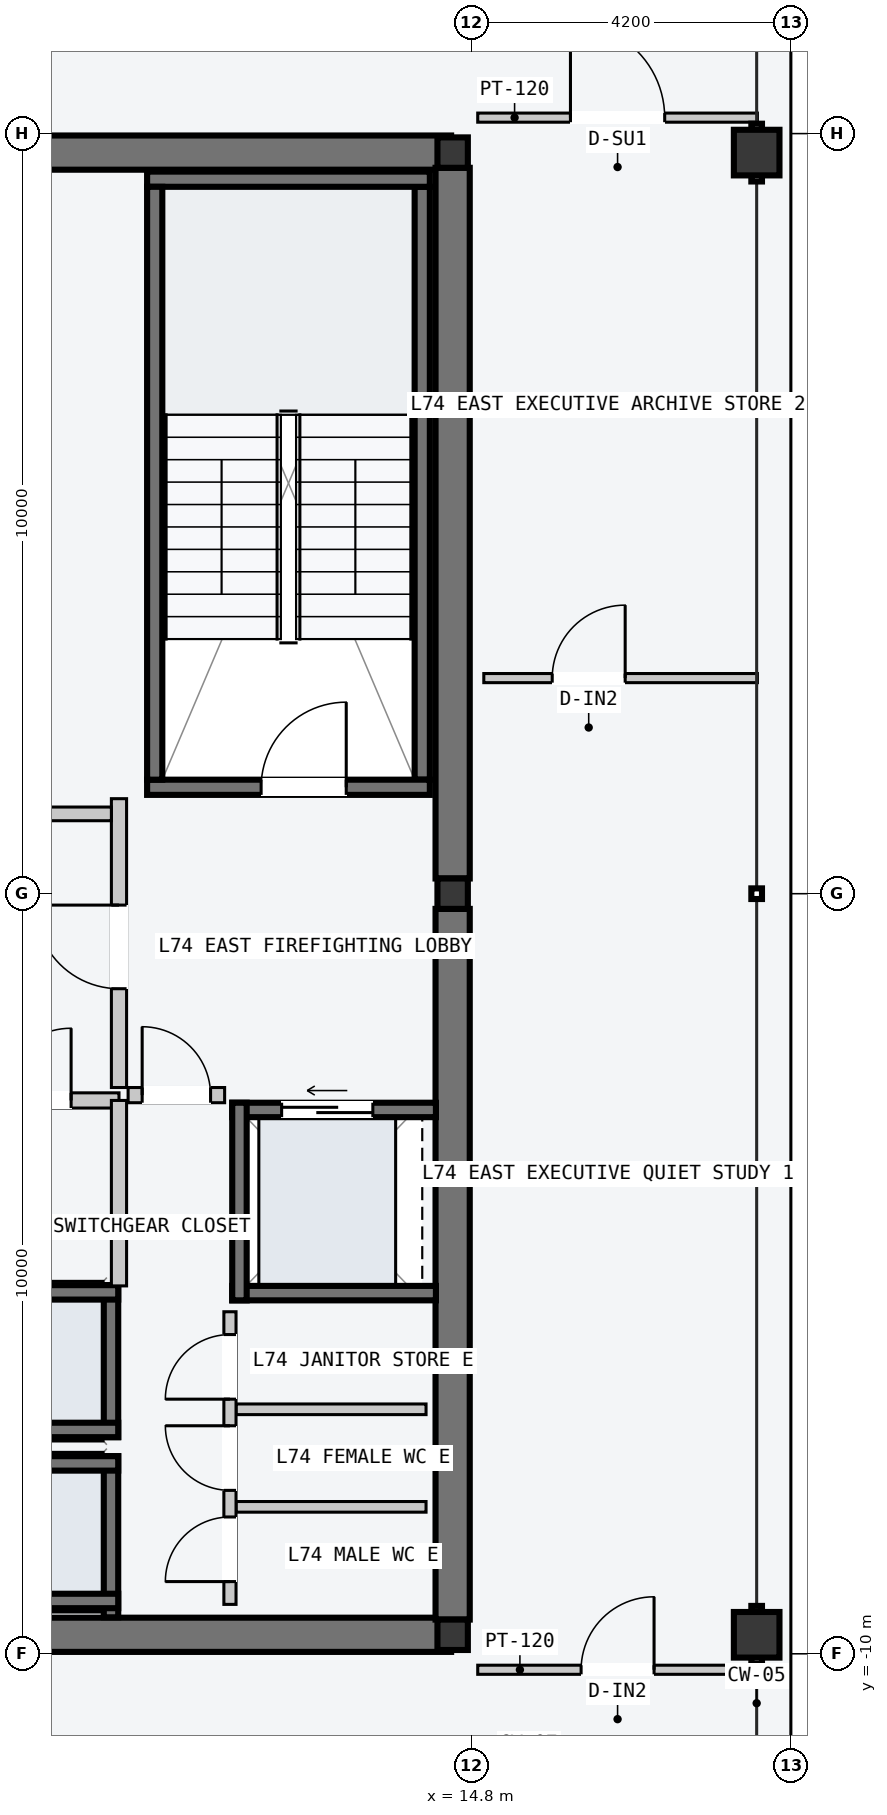
"""IFC4 building model, lengths in metres.
Left out: names, types, materials, properties, quantities, classifications, styles, units other than length and angle.
Written with IfcOpenShell. Run it as: python <this file> out.ifc"""

import sys

from ifc_helpers import new_model, si_unit, direction, frame, frame_2d, origin, origin_2d, place, context, subcontext, project, spatial, rectangle, hollow_rectangle, i_section, extrude, element, fill, save


model = new_model("IFC4")
c1 = context("Model", 3, precision=1e-05, world=origin(), true_north=direction((0.0, 1.0)))
c2 = subcontext(c1, "Body", "Model", "MODEL_VIEW")
j1 = project(units=[si_unit("LENGTHUNIT", "METRE"), si_unit("PLANEANGLEUNIT", "RADIAN")], contexts=[c1])
p1 = place(None, origin())
s1 = spatial("IfcSite", under=j1, at=p1, CompositionType="ELEMENT")
p2 = place(p1, origin())
s2 = spatial("IfcBuilding", under=s1, at=p2, CompositionType="ELEMENT")
p3 = place(p2, frame((0.0, 0.0, 280.8)))
s3 = spatial("IfcBuildingStorey", under=s2, at=p3, CompositionType="ELEMENT", Elevation=280.8)
for number, where, z_axis, x_axis in (
    (1, (8.07, -9.75, -0.2), (0.0, 0.0, 1.0), (1.0, 0.0, 0.0)),
    (2, (8.07, 9.75, -0.2), (0.0, 0.0, 1.0), (1.0, 0.0, 0.0)),
):
    element("IfcWall", number, at=place(p3, frame(where, z_axis=z_axis, x_axis=x_axis)), inside=s3, PredefinedType="SHEAR", context=c2, shape_type="SweptSolid", body=[
        extrude(rectangle(XDim=6.46, YDim=0.45, at=frame_2d((3.23, 0.0))), origin(), (0.0, 0.0, 1.0), 3.6),
    ])
for number, where, z_axis, x_axis in (
    (3, (14.55, -9.55, -0.2), (0.0, 0.0, 1.0), (0.0, 1.0, 0.0)),
    (4, (14.55, 0.2, -0.2), (0.0, 0.0, 1.0), (0.0, 1.0, 0.0)),
):
    element("IfcWall", number, at=place(p3, frame(where, z_axis=z_axis, x_axis=x_axis)), inside=s3, PredefinedType="SHEAR", context=c2, shape_type="SweptSolid", body=[
        extrude(rectangle(XDim=9.35, YDim=0.45, at=frame_2d((4.675, 0.0))), origin(), (0.0, 0.0, 1.0), 3.6),
    ])
p4 = place(p3, frame((14.15, 1.5, -0.2), z_axis=(0.0, 0.0, 1.0), x_axis=(0.0, 1.0, 0.0)))
e5 = element("IfcWall", 5, at=p4, inside=s3, PredefinedType="SOLIDWALL", context=c2, shape_type="SweptSolid", body=[
    extrude(rectangle(XDim=7.8, YDim=0.2, at=frame_2d((3.9, 0.0))), origin(), (0.0, 0.0, 1.0), 3.6),
])
p5 = place(p3, frame((10.53, 1.4, -0.2), z_axis=(0.0, 0.0, 1.0), x_axis=(1.0, 0.0, 0.0)))
e6 = element("IfcWall", 6, at=p5, inside=s3, PredefinedType="SOLIDWALL", context=c2, shape_type="SweptSolid", body=[
    extrude(rectangle(XDim=3.72, YDim=0.2, at=frame_2d((1.86, 0.0))), origin(), (0.0, 0.0, 1.0), 3.6),
])
p6 = place(p5, frame((1.5, 0.0, 0.2)))
e7 = element("IfcOpeningElement", 7, at=p6, cuts=e6, PredefinedType="OPENING", context=c2, shape_type="SweptSolid", body=[
    extrude(rectangle(XDim=1.12, YDim=2.18, at=frame_2d((0.56, 1.09))), frame((0.0, 0.11, 0.0), z_axis=(0.0, -1.0, 0.0), x_axis=(1.0, 0.0, 0.0)), (0.0, 0.0, 1.0), 0.22),
])
p7 = place(p3, frame((10.53, 9.4, -0.2), z_axis=(0.0, 0.0, 1.0), x_axis=(1.0, 0.0, 0.0)))
e8 = element("IfcWall", 8, at=p7, inside=s3, PredefinedType="SOLIDWALL", context=c2, shape_type="SweptSolid", body=[
    extrude(rectangle(XDim=3.72, YDim=0.2, at=frame_2d((1.86, 0.0))), origin(), (0.0, 0.0, 1.0), 3.6),
])
p8 = place(p3, frame((10.63, 1.5, -0.2), z_axis=(0.0, 0.0, 1.0), x_axis=(0.0, 1.0, 0.0)))
e9 = element("IfcWall", 9, at=p8, inside=s3, PredefinedType="SOLIDWALL", context=c2, shape_type="SweptSolid", body=[
    extrude(rectangle(XDim=7.8, YDim=0.2, at=frame_2d((3.9, 0.0))), origin(), (0.0, 0.0, 1.0), 3.6),
])
for number, where, z_axis, x_axis in (
    (10, (14.55, -9.75, 0.0), (0.0, 0.0, 1.0), (1.0, 0.0, 0.0)),
    (11, (14.55, 0.0, 0.0), (0.0, 0.0, 1.0), (1.0, 0.0, 0.0)),
    (12, (14.55, 9.75, 0.0), (0.0, 0.0, 1.0), (1.0, 0.0, 0.0)),
):
    element("IfcColumn", number, at=place(p3, frame(where, z_axis=z_axis, x_axis=x_axis)), inside=s3, PredefinedType="COLUMN", context=c2, shape_type="SweptSolid", body=[
        extrude(i_section(OverallWidth=0.4, OverallDepth=0.4, WebThickness=0.013, FlangeThickness=0.021, at=origin_2d()), origin(), (0.0, 0.0, 1.0), 3.6),
    ])
for number, where, z_axis, x_axis in (
    (13, (18.55, -9.75, 0.0), (0.0, 0.0, 1.0), (0.0, 1.0, 0.0)),
    (14, (18.55, 9.75, 0.0), (0.0, 0.0, 1.0), (0.0, 1.0, 0.0)),
):
    element("IfcColumn", number, at=place(p3, frame(where, z_axis=z_axis, x_axis=x_axis)), inside=s3, PredefinedType="COLUMN", context=c2, shape_type="SweptSolid", body=[
        extrude(hollow_rectangle(XDim=0.6, YDim=0.6, WallThickness=0.025, at=origin_2d()), origin(), (0.0, 0.0, 1.0), 3.6),
    ])
p9 = place(p3, frame((10.055, -9.52, -0.2), z_axis=(0.0, 0.0, 1.0), x_axis=(0.0, 1.0, 0.0)))
e15 = element("IfcWall", 15, at=p9, inside=s3, PredefinedType="SOLIDWALL", context=c2, shape_type="SweptSolid", body=[
    extrude(rectangle(XDim=2.12, YDim=0.19, at=frame_2d((1.06, 0.0))), origin(), (0.0, 0.0, 1.0), 3.6),
])
for number, where, z_axis, x_axis in (
    (16, (7.95, -7.495, -0.2), (0.0, 0.0, 1.0), (1.0, 0.0, 0.0)),
    (17, (7.95, -9.305, -0.2), (0.0, 0.0, 1.0), (1.0, 0.0, 0.0)),
):
    element("IfcWall", number, at=place(p3, frame(where, z_axis=z_axis, x_axis=x_axis)), inside=s3, PredefinedType="SOLIDWALL", context=c2, shape_type="SweptSolid", body=[
        extrude(rectangle(XDim=2.2, YDim=0.19, at=frame_2d((1.1, 0.0))), origin(), (0.0, 0.0, 1.0), 3.6),
    ])
p10 = place(p3, frame((10.055, -7.15, -0.2), z_axis=(0.0, 0.0, 1.0), x_axis=(0.0, 1.0, 0.0)))
e18 = element("IfcWall", 18, at=p10, inside=s3, PredefinedType="SOLIDWALL", context=c2, shape_type="SweptSolid", body=[
    extrude(rectangle(XDim=2.0, YDim=0.19, at=frame_2d((1.0, 0.0))), origin(), (0.0, 0.0, 1.0), 3.6),
])
for number, where, z_axis, x_axis in (
    (19, (7.95, -5.245, -0.2), (0.0, 0.0, 1.0), (1.0, 0.0, 0.0)),
    (20, (7.95, -7.055, -0.2), (0.0, 0.0, 1.0), (1.0, 0.0, 0.0)),
):
    element("IfcWall", number, at=place(p3, frame(where, z_axis=z_axis, x_axis=x_axis)), inside=s3, PredefinedType="SOLIDWALL", context=c2, shape_type="SweptSolid", body=[
        extrude(rectangle(XDim=2.2, YDim=0.19, at=frame_2d((1.1, 0.0))), origin(), (0.0, 0.0, 1.0), 3.6),
    ])
p11 = place(p3, frame((11.65, -2.845, -0.2), z_axis=(0.0, 0.0, 1.0), x_axis=(1.0, 0.0, 0.0)))
e21 = element("IfcWall", 21, at=p11, inside=s3, PredefinedType="SOLIDWALL", context=c2, shape_type="SweptSolid", body=[
    extrude(rectangle(XDim=2.68, YDim=0.19, at=frame_2d((1.34, 0.0))), origin(), (0.0, 0.0, 1.0), 3.6),
])
p12 = place(p11, frame((0.65, 0.0, 0.2)))
e22 = element("IfcOpeningElement", 22, at=p12, cuts=e21, PredefinedType="OPENING", context=c2, shape_type="SweptSolid", body=[
    extrude(rectangle(XDim=1.2, YDim=2.2, at=frame_2d((0.6, 1.1))), frame((0.0, 0.105, 0.0), z_axis=(0.0, -1.0, 0.0), x_axis=(1.0, 0.0, 0.0)), (0.0, 0.0, 1.0), 0.21),
])
p13 = place(p3, frame((11.65, -5.255, -0.2), z_axis=(0.0, 0.0, 1.0), x_axis=(1.0, 0.0, 0.0)))
e23 = element("IfcWall", 23, at=p13, inside=s3, PredefinedType="SOLIDWALL", context=c2, shape_type="SweptSolid", body=[
    extrude(rectangle(XDim=2.68, YDim=0.19, at=frame_2d((1.34, 0.0))), origin(), (0.0, 0.0, 1.0), 3.6),
])
p14 = place(p3, frame((11.745, -5.35, -0.2), z_axis=(0.0, 0.0, 1.0), x_axis=(0.0, 1.0, 0.0)))
e24 = element("IfcWall", 24, at=p14, inside=s3, PredefinedType="SOLIDWALL", context=c2, shape_type="SweptSolid", body=[
    extrude(rectangle(XDim=2.6, YDim=0.19, at=frame_2d((1.3, 0.0))), origin(), (0.0, 0.0, 1.0), 3.6),
])
p15 = place(p3, frame((10.16, -2.55, 0.0), z_axis=(0.0, 0.0, 1.0), x_axis=(0.0, 1.0, 0.0)))
e25 = element("IfcWall", 25, at=p15, inside=s3, PredefinedType="PARTITIONING", context=c2, shape_type="SweptSolid", body=[
    extrude(rectangle(XDim=3.8, YDim=0.2, at=frame_2d((1.9, 0.0))), origin(), (0.0, 0.0, 1.0), 3.4),
])
p16 = place(p15, frame((1.3, 0.0, 0.0)))
e26 = element("IfcOpeningElement", 26, at=p16, cuts=e25, PredefinedType="OPENING", context=c2, shape_type="SweptSolid", body=[
    extrude(rectangle(XDim=1.1, YDim=2.15, at=frame_2d((0.55, 1.075))), frame((0.0, 0.11, 0.0), z_axis=(0.0, -1.0, 0.0), x_axis=(1.0, 0.0, 0.0)), (0.0, 0.0, 1.0), 0.22),
])
p17 = place(p3, frame((10.28, -2.65, 0.0), z_axis=(0.0, 0.0, 1.0), x_axis=(1.0, 0.0, 0.0)))
e27 = element("IfcWall", 27, at=p17, inside=s3, PredefinedType="PARTITIONING", context=c2, shape_type="SweptSolid", body=[
    extrude(rectangle(XDim=1.27, YDim=0.2, at=frame_2d((0.635, 0.0))), origin(), (0.0, 0.0, 1.0), 3.4),
])
p18 = place(p17, frame((0.185, 0.0, 0.0)))
e28 = element("IfcOpeningElement", 28, at=p18, cuts=e27, PredefinedType="OPENING", context=c2, shape_type="SweptSolid", body=[
    extrude(rectangle(XDim=0.9, YDim=2.15, at=frame_2d((0.45, 1.075))), frame((0.0, 0.11, 0.0), z_axis=(0.0, -1.0, 0.0), x_axis=(1.0, 0.0, 0.0)), (0.0, 0.0, 1.0), 0.22),
])
p19 = place(p3, frame((7.96, -2.72, 0.0), z_axis=(0.0, 0.0, 1.0), x_axis=(1.0, 0.0, 0.0)))
e29 = element("IfcWall", 29, at=p19, inside=s3, PredefinedType="PARTITIONING", context=c2, shape_type="SweptSolid", body=[
    extrude(rectangle(XDim=2.2, YDim=0.2, at=frame_2d((1.1, 0.0))), origin(), (0.0, 0.0, 1.0), 3.4),
])
p20 = place(p19, frame((0.62, 0.0, 0.0)))
e30 = element("IfcOpeningElement", 30, at=p20, cuts=e29, PredefinedType="OPENING", context=c2, shape_type="SweptSolid", body=[
    extrude(rectangle(XDim=0.95, YDim=2.1, at=frame_2d((0.475, 1.05))), frame((0.0, 0.11, 0.0), z_axis=(0.0, -1.0, 0.0), x_axis=(1.0, 0.0, 0.0)), (0.0, 0.0, 1.0), 0.22),
])
p21 = place(p3, frame((10.16, -5.16, 0.0), z_axis=(0.0, 0.0, 1.0), x_axis=(0.0, 1.0, 0.0)))
e31 = element("IfcWall", 31, at=p21, inside=s3, PredefinedType="PARTITIONING", context=c2, shape_type="SweptSolid", body=[
    extrude(rectangle(XDim=2.44, YDim=0.2, at=frame_2d((1.22, 0.0))), origin(), (0.0, 0.0, 1.0), 3.4),
])
for number, where, z_axis, x_axis in (
    (32, (11.7, -8.067, 0.0), (0.0, 0.0, 1.0), (1.0, 0.0, 0.0)),
    (33, (11.7, -6.783, 0.0), (0.0, 0.0, 1.0), (1.0, 0.0, 0.0)),
):
    element("IfcWall", number, at=place(p3, frame(where, z_axis=z_axis, x_axis=x_axis)), inside=s3, PredefinedType="PARTITIONING", context=c2, shape_type="SweptSolid", body=[
        extrude(rectangle(XDim=2.5, YDim=0.14, at=frame_2d((1.25, 0.0))), origin(), (0.0, 0.0, 1.0), 3.4),
    ])
p22 = place(p3, frame((11.62, -9.35, 0.0), z_axis=(0.0, 0.0, 1.0), x_axis=(0.0, 1.0, 0.0)))
e34 = element("IfcWall", 34, at=p22, inside=s3, PredefinedType="PARTITIONING", context=c2, shape_type="SweptSolid", body=[
    extrude(rectangle(XDim=3.85, YDim=0.16, at=frame_2d((1.925, 0.0))), origin(), (0.0, 0.0, 1.0), 3.4),
])
p23 = place(p22, frame((0.3, 0.0, 0.0)))
e35 = element("IfcOpeningElement", 35, at=p23, cuts=e34, PredefinedType="OPENING", context=c2, shape_type="SweptSolid", body=[
    extrude(rectangle(XDim=0.85, YDim=2.12, at=frame_2d((0.425, 1.06))), frame((0.0, 0.09, 0.0), z_axis=(0.0, -1.0, 0.0), x_axis=(1.0, 0.0, 0.0)), (0.0, 0.0, 1.0), 0.18),
])
p24 = place(p22, frame((1.5, 0.0, 0.0)))
e36 = element("IfcOpeningElement", 36, at=p24, cuts=e34, PredefinedType="OPENING", context=c2, shape_type="SweptSolid", body=[
    extrude(rectangle(XDim=0.85, YDim=2.12, at=frame_2d((0.425, 1.06))), frame((0.0, 0.09, 0.0), z_axis=(0.0, -1.0, 0.0), x_axis=(1.0, 0.0, 0.0)), (0.0, 0.0, 1.0), 0.18),
])
p25 = place(p22, frame((2.7, 0.0, 0.0)))
e37 = element("IfcOpeningElement", 37, at=p25, cuts=e34, PredefinedType="OPENING", context=c2, shape_type="SweptSolid", body=[
    extrude(rectangle(XDim=0.85, YDim=2.12, at=frame_2d((0.425, 1.06))), frame((0.0, 0.09, 0.0), z_axis=(0.0, -1.0, 0.0), x_axis=(1.0, 0.0, 0.0)), (0.0, 0.0, 1.0), 0.18),
])
p26 = place(p3, frame((-0.49, 1.05, 0.0), z_axis=(0.0, 0.0, 1.0), x_axis=(1.0, 0.0, 0.0)))
e38 = element("IfcWall", 38, at=p26, inside=s3, PredefinedType="PARTITIONING", context=c2, shape_type="SweptSolid", body=[
    extrude(rectangle(XDim=10.55, YDim=0.18, at=frame_2d((5.275, 0.0))), origin(), (0.0, 0.0, 1.0), 3.4),
])
p27 = place(p3, frame((14.88, 10.21, 0.0), z_axis=(0.0, 0.0, 1.0), x_axis=(1.0, 0.0, 0.0)))
e39 = element("IfcWall", 39, at=p27, inside=s3, PredefinedType="PARTITIONING", context=c2, shape_type="SweptSolid", body=[
    extrude(rectangle(XDim=3.68, YDim=0.12, at=frame_2d((1.84, 0.0))), origin(), (0.0, 0.0, 1.0), 3.4),
])
p28 = place(p27, frame((1.22, 0.0, 0.0)))
e40 = element("IfcOpeningElement", 40, at=p28, cuts=e39, PredefinedType="OPENING", context=c2, shape_type="SweptSolid", body=[
    extrude(rectangle(XDim=1.24, YDim=2.24, at=frame_2d((0.62, 1.12))), frame((0.0, 0.07, 0.0), z_axis=(0.0, -1.0, 0.0), x_axis=(1.0, 0.0, 0.0)), (0.0, 0.0, 1.0), 0.14),
])
p29 = place(p3, frame((14.88, -10.21, 0.0), z_axis=(0.0, 0.0, 1.0), x_axis=(1.0, 0.0, 0.0)))
e41 = element("IfcWall", 41, at=p29, inside=s3, PredefinedType="PARTITIONING", context=c2, shape_type="SweptSolid", body=[
    extrude(rectangle(XDim=3.68, YDim=0.12, at=frame_2d((1.84, 0.0))), origin(), (0.0, 0.0, 1.0), 3.4),
])
p30 = place(p29, frame((1.36, 0.0, 0.0)))
e42 = element("IfcOpeningElement", 42, at=p30, cuts=e41, PredefinedType="OPENING", context=c2, shape_type="SweptSolid", body=[
    extrude(rectangle(XDim=0.96, YDim=2.18, at=frame_2d((0.48, 1.09))), frame((0.0, 0.07, 0.0), z_axis=(0.0, -1.0, 0.0), x_axis=(1.0, 0.0, 0.0)), (0.0, 0.0, 1.0), 0.14),
])
p31 = place(p3, frame((14.96, 2.836, 0.0), z_axis=(0.0, 0.0, 1.0), x_axis=(1.0, 0.0, 0.0)))
e43 = element("IfcWall", 43, at=p31, inside=s3, PredefinedType="PARTITIONING", context=c2, shape_type="SweptSolid", body=[
    extrude(rectangle(XDim=3.6, YDim=0.12, at=frame_2d((1.8, 0.0))), origin(), (0.0, 0.0, 1.0), 3.4),
])
p32 = place(p31, frame((0.9, 0.0, 0.0)))
e44 = element("IfcOpeningElement", 44, at=p32, cuts=e43, PredefinedType="OPENING", context=c2, shape_type="SweptSolid", body=[
    extrude(rectangle(XDim=0.96, YDim=2.18, at=frame_2d((0.48, 1.09))), frame((0.0, 0.07, 0.0), z_axis=(0.0, -1.0, 0.0), x_axis=(1.0, 0.0, 0.0)), (0.0, 0.0, 1.0), 0.14),
])
p33 = place(p6, origin())
e45 = element("IfcDoor", 45, at=p33, inside=s3, OperationType="SINGLE_SWING_RIGHT", PredefinedType="DOOR", context=c2, shape_type="SweptSolid", body=[
    extrude(rectangle(XDim=1.12, YDim=2.18, at=frame_2d((0.56, 1.09))), frame((0.0, 0.025, 0.0), z_axis=(0.0, -1.0, 0.0), x_axis=(1.0, 0.0, 0.0)), (0.0, 0.0, 1.0), 0.05),
])
fill(e7, e45)
p34 = place(p12, origin())
e46 = element("IfcDoor", 46, at=p34, inside=s3, OperationType="SLIDING_TO_LEFT", PredefinedType="DOOR", context=c2, shape_type="SweptSolid", body=[
    extrude(rectangle(XDim=1.2, YDim=2.2, at=frame_2d((0.6, 1.1))), frame((0.0, 0.025, 0.0), z_axis=(0.0, -1.0, 0.0), x_axis=(1.0, 0.0, 0.0)), (0.0, 0.0, 1.0), 0.05),
])
fill(e22, e46)
p35 = place(p16, origin())
e47 = element("IfcDoor", 47, at=p35, inside=s3, OperationType="SINGLE_SWING_RIGHT", PredefinedType="DOOR", context=c2, shape_type="SweptSolid", body=[
    extrude(rectangle(XDim=1.1, YDim=2.15, at=frame_2d((0.55, 1.075))), frame((0.0, 0.025, 0.0), z_axis=(0.0, -1.0, 0.0), x_axis=(1.0, 0.0, 0.0)), (0.0, 0.0, 1.0), 0.05),
])
fill(e26, e47)
p36 = place(p18, origin())
e48 = element("IfcDoor", 48, at=p36, inside=s3, OperationType="SINGLE_SWING_LEFT", PredefinedType="DOOR", context=c2, shape_type="SweptSolid", body=[
    extrude(rectangle(XDim=0.9, YDim=2.15, at=frame_2d((0.45, 1.075))), frame((0.0, 0.025, 0.0), z_axis=(0.0, -1.0, 0.0), x_axis=(1.0, 0.0, 0.0)), (0.0, 0.0, 1.0), 0.05),
])
fill(e28, e48)
p37 = place(p20, origin())
e49 = element("IfcDoor", 49, at=p37, inside=s3, OperationType="SINGLE_SWING_RIGHT", PredefinedType="DOOR", context=c2, shape_type="SweptSolid", body=[
    extrude(rectangle(XDim=0.95, YDim=2.1, at=frame_2d((0.475, 1.05))), frame((0.0, 0.025, 0.0), z_axis=(0.0, -1.0, 0.0), x_axis=(1.0, 0.0, 0.0)), (0.0, 0.0, 1.0), 0.05),
])
fill(e30, e49)
p38 = place(p23, origin())
e50 = element("IfcDoor", 50, at=p38, inside=s3, OperationType="SINGLE_SWING_LEFT", PredefinedType="DOOR", context=c2, shape_type="SweptSolid", body=[
    extrude(rectangle(XDim=0.85, YDim=2.12, at=frame_2d((0.425, 1.06))), frame((0.0, 0.025, 0.0), z_axis=(0.0, -1.0, 0.0), x_axis=(1.0, 0.0, 0.0)), (0.0, 0.0, 1.0), 0.05),
])
fill(e35, e50)
p39 = place(p24, origin())
e51 = element("IfcDoor", 51, at=p39, inside=s3, OperationType="SINGLE_SWING_RIGHT", PredefinedType="DOOR", context=c2, shape_type="SweptSolid", body=[
    extrude(rectangle(XDim=0.85, YDim=2.12, at=frame_2d((0.425, 1.06))), frame((0.0, 0.025, 0.0), z_axis=(0.0, -1.0, 0.0), x_axis=(1.0, 0.0, 0.0)), (0.0, 0.0, 1.0), 0.05),
])
fill(e36, e51)
p40 = place(p25, origin())
e52 = element("IfcDoor", 52, at=p40, inside=s3, OperationType="SINGLE_SWING_LEFT", PredefinedType="DOOR", context=c2, shape_type="SweptSolid", body=[
    extrude(rectangle(XDim=0.85, YDim=2.12, at=frame_2d((0.425, 1.06))), frame((0.0, 0.025, 0.0), z_axis=(0.0, -1.0, 0.0), x_axis=(1.0, 0.0, 0.0)), (0.0, 0.0, 1.0), 0.05),
])
fill(e37, e52)
p41 = place(p28, origin())
e53 = element("IfcDoor", 53, at=p41, inside=s3, OperationType="SINGLE_SWING_LEFT", PredefinedType="DOOR", context=c2, shape_type="SweptSolid", body=[
    extrude(rectangle(XDim=1.24, YDim=2.24, at=frame_2d((0.62, 1.12))), frame((0.0, 0.025, 0.0), z_axis=(0.0, -1.0, 0.0), x_axis=(1.0, 0.0, 0.0)), (0.0, 0.0, 1.0), 0.05),
])
fill(e40, e53)
p42 = place(p30, origin())
e54 = element("IfcDoor", 54, at=p42, inside=s3, OperationType="SINGLE_SWING_RIGHT", PredefinedType="DOOR", context=c2, shape_type="SweptSolid", body=[
    extrude(rectangle(XDim=0.96, YDim=2.18, at=frame_2d((0.48, 1.09))), frame((0.0, 0.025, 0.0), z_axis=(0.0, -1.0, 0.0), x_axis=(1.0, 0.0, 0.0)), (0.0, 0.0, 1.0), 0.05),
])
fill(e42, e54)
p43 = place(p32, origin())
e55 = element("IfcDoor", 55, at=p43, inside=s3, OperationType="SINGLE_SWING_RIGHT", PredefinedType="DOOR", context=c2, shape_type="SweptSolid", body=[
    extrude(rectangle(XDim=0.96, YDim=2.18, at=frame_2d((0.48, 1.09))), frame((0.0, 0.025, 0.0), z_axis=(0.0, -1.0, 0.0), x_axis=(1.0, 0.0, 0.0)), (0.0, 0.0, 1.0), 0.05),
])
fill(e44, e55)
save(model, sys.argv[1])
